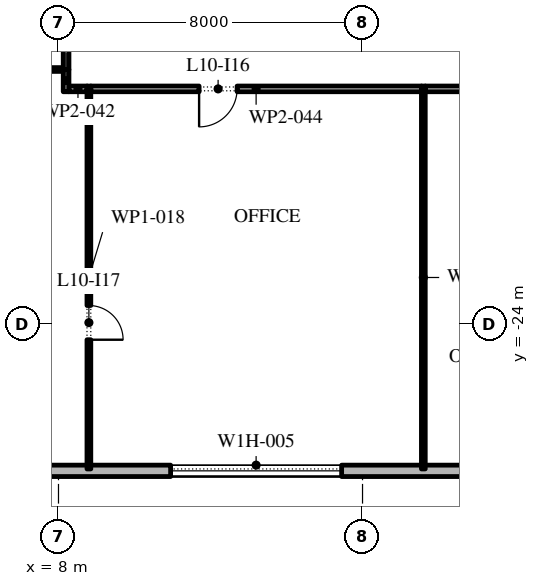
"""IFC4 building model, lengths in metres.
Left out: names, types, materials, properties, quantities, classifications, styles, units other than length and angle.
Written with IfcOpenShell. Run it as: python <this file> out.ifc"""

import sys

from ifc_helpers import new_model, si_unit, direction, frame, frame_2d, origin, place, context, subcontext, project, spatial, rectangle, extrude, element, fill, save


model = new_model("IFC4")
c1 = context("Model", 3, precision=1e-05, world=origin(), true_north=direction((0.0, 1.0)))
c2 = subcontext(c1, "Body", "Model", "MODEL_VIEW")
j1 = project(units=[si_unit("LENGTHUNIT", "METRE"), si_unit("PLANEANGLEUNIT", "RADIAN")], contexts=[c1])
p1 = place(None, origin())
s1 = spatial("IfcSite", under=j1, at=p1, CompositionType="ELEMENT")
p2 = place(p1, origin())
s2 = spatial("IfcBuilding", under=s1, at=p2, CompositionType="ELEMENT")
p3 = place(p2, frame((0.0, 0.0, 52.2)))
s3 = spatial("IfcBuildingStorey", under=s2, at=p3, CompositionType="ELEMENT", Elevation=52.2)
p4 = place(p3, frame((-26.1, -27.85, 0.0), z_axis=(0.0, 0.0, 1.0), x_axis=(1.0, 0.0, 0.0)))
e1 = element("IfcWall", 1, at=p4, inside=s3, PredefinedType="STANDARD", context=c2, shape_type="SweptSolid", body=[
    extrude(rectangle(XDim=52.5, YDim=0.3, at=frame_2d((26.25, 0.0))), origin(), (0.0, 0.0, 1.0), 4.0),
])
p5 = place(p4, frame((2.0, 0.0, 0.45)))
e2 = element("IfcOpeningElement", 2, at=p5, cuts=e1, PredefinedType="OPENING", context=c2, shape_type="SweptSolid", body=[
    extrude(rectangle(XDim=4.5, YDim=2.75, at=frame_2d((2.25, 1.375))), frame((0.0, 0.16, 0.0), z_axis=(0.0, -1.0, 0.0), x_axis=(1.0, 0.0, 0.0)), (0.0, 0.0, 1.0), 0.32),
])
p6 = place(p4, frame((10.65, 0.0, 0.45)))
e3 = element("IfcOpeningElement", 3, at=p6, cuts=e1, PredefinedType="OPENING", context=c2, shape_type="SweptSolid", body=[
    extrude(rectangle(XDim=4.5, YDim=2.75, at=frame_2d((2.25, 1.375))), frame((0.0, 0.16, 0.0), z_axis=(0.0, -1.0, 0.0), x_axis=(1.0, 0.0, 0.0)), (0.0, 0.0, 1.0), 0.32),
])
p7 = place(p4, frame((20.5, 0.0, 0.0)))
e4 = element("IfcOpeningElement", 4, at=p7, cuts=e1, PredefinedType="OPENING", context=c2, shape_type="SweptSolid", body=[
    extrude(rectangle(XDim=2.4, YDim=3.5, at=frame_2d((1.2, 1.75))), frame((0.0, 0.16, 0.0), z_axis=(0.0, -1.0, 0.0), x_axis=(1.0, 0.0, 0.0)), (0.0, 0.0, 1.0), 0.32),
])
p8 = place(p4, frame((28.25, 0.0, 0.45)))
e5 = element("IfcOpeningElement", 5, at=p8, cuts=e1, PredefinedType="OPENING", context=c2, shape_type="SweptSolid", body=[
    extrude(rectangle(XDim=4.5, YDim=2.75, at=frame_2d((2.25, 1.375))), frame((0.0, 0.16, 0.0), z_axis=(0.0, -1.0, 0.0), x_axis=(1.0, 0.0, 0.0)), (0.0, 0.0, 1.0), 0.32),
])
p9 = place(p4, frame((37.05, 0.0, 0.45)))
e6 = element("IfcOpeningElement", 6, at=p9, cuts=e1, PredefinedType="OPENING", context=c2, shape_type="SweptSolid", body=[
    extrude(rectangle(XDim=4.5, YDim=2.75, at=frame_2d((2.25, 1.375))), frame((0.0, 0.16, 0.0), z_axis=(0.0, -1.0, 0.0), x_axis=(1.0, 0.0, 0.0)), (0.0, 0.0, 1.0), 0.32),
])
p10 = place(p4, frame((45.85, 0.0, 0.45)))
e7 = element("IfcOpeningElement", 7, at=p10, cuts=e1, PredefinedType="OPENING", context=c2, shape_type="SweptSolid", body=[
    extrude(rectangle(XDim=4.5, YDim=2.75, at=frame_2d((2.25, 1.375))), frame((0.0, 0.16, 0.0), z_axis=(0.0, -1.0, 0.0), x_axis=(1.0, 0.0, 0.0)), (0.0, 0.0, 1.0), 0.32),
])
p11 = place(p3, frame((8.2, -17.875, 0.0), z_axis=(0.0, 0.0, 1.0), x_axis=(0.0, 1.0, 0.0)))
e8 = element("IfcWall", 8, at=p11, inside=s3, PredefinedType="PARTITIONING", context=c2, shape_type="SweptSolid", body=[
    extrude(rectangle(XDim=0.585, YDim=0.15, at=frame_2d((0.292, 0.0))), origin(), (0.0, 0.0, 1.0), 4.0),
])
p12 = place(p3, frame((8.125, -17.29, 0.0), z_axis=(0.0, 0.0, 1.0), x_axis=(-1.0, 0.0, 0.0)))
e9 = element("IfcWall", 9, at=p12, inside=s3, PredefinedType="PARTITIONING", context=c2, shape_type="SweptSolid", body=[
    extrude(rectangle(XDim=8.075, YDim=0.1, at=frame_2d((4.038, 0.0))), origin(), (0.0, 0.0, 1.0), 4.0),
])
p13 = place(p3, frame((8.2, -17.29, 0.0), z_axis=(0.0, 0.0, 1.0), x_axis=(0.0, 1.0, 0.0)))
e10 = element("IfcWall", 10, at=p13, inside=s3, PredefinedType="PARTITIONING", context=c2, shape_type="SweptSolid", body=[
    extrude(rectangle(XDim=8.74, YDim=0.15, at=frame_2d((4.37, 0.0))), origin(), (0.0, 0.0, 1.0), 4.0),
])
p14 = place(p13, frame((3.89, 0.0, 0.0)))
e11 = element("IfcOpeningElement", 11, at=p14, cuts=e10, PredefinedType="OPENING", context=c2, shape_type="SweptSolid", body=[
    extrude(rectangle(XDim=1.0, YDim=2.1, at=frame_2d((0.5, 1.05))), frame((0.0, 0.085, 0.0), z_axis=(0.0, -1.0, 0.0), x_axis=(1.0, 0.0, 0.0)), (0.0, 0.0, 1.0), 0.17),
])
p15 = place(p3, frame((8.8, -27.8, 0.0), z_axis=(0.0, 0.0, 1.0), x_axis=(0.0, 1.0, 0.0)))
e12 = element("IfcWall", 12, at=p15, inside=s3, PredefinedType="PARTITIONING", context=c2, shape_type="SweptSolid", body=[
    extrude(rectangle(XDim=10.075, YDim=0.1, at=frame_2d((5.038, 0.0))), origin(), (0.0, 0.0, 1.0), 4.0),
])
p16 = place(p15, frame((3.4, 0.0, 0.0)))
e13 = element("IfcOpeningElement", 13, at=p16, cuts=e12, PredefinedType="OPENING", context=c2, shape_type="SweptSolid", body=[
    extrude(rectangle(XDim=0.9, YDim=2.1, at=frame_2d((0.45, 1.05))), frame((0.0, 0.06, 0.0), z_axis=(0.0, -1.0, 0.0), x_axis=(1.0, 0.0, 0.0)), (0.0, 0.0, 1.0), 0.12),
])
p17 = place(p3, frame((8.75, -17.8, 0.0), z_axis=(0.0, 0.0, 1.0), x_axis=(-1.0, 0.0, 0.0)))
e14 = element("IfcWall", 14, at=p17, inside=s3, PredefinedType="PARTITIONING", context=c2, shape_type="SweptSolid", body=[
    extrude(rectangle(XDim=0.475, YDim=0.15, at=frame_2d((0.238, 0.0))), origin(), (0.0, 0.0, 1.0), 4.0),
])
p18 = place(p3, frame((17.6, -27.8, 0.0), z_axis=(0.0, 0.0, 1.0), x_axis=(0.0, 1.0, 0.0)))
e15 = element("IfcWall", 15, at=p18, inside=s3, PredefinedType="PARTITIONING", context=c2, shape_type="SweptSolid", body=[
    extrude(rectangle(XDim=10.075, YDim=0.1, at=frame_2d((5.038, 0.0))), origin(), (0.0, 0.0, 1.0), 4.0),
])
p19 = place(p3, frame((17.55, -17.8, 0.0), z_axis=(0.0, 0.0, 1.0), x_axis=(-1.0, 0.0, 0.0)))
e16 = element("IfcWall", 16, at=p19, inside=s3, PredefinedType="PARTITIONING", context=c2, shape_type="SweptSolid", body=[
    extrude(rectangle(XDim=8.7, YDim=0.15, at=frame_2d((4.35, 0.0))), origin(), (0.0, 0.0, 1.0), 4.0),
])
p20 = place(p19, frame((4.85, 0.0, 0.0)))
e17 = element("IfcOpeningElement", 17, at=p20, cuts=e16, PredefinedType="OPENING", context=c2, shape_type="SweptSolid", body=[
    extrude(rectangle(XDim=1.0, YDim=2.1, at=frame_2d((0.5, 1.05))), frame((0.0, 0.085, 0.0), z_axis=(0.0, -1.0, 0.0), x_axis=(1.0, 0.0, 0.0)), (0.0, 0.0, 1.0), 0.17),
])
p21 = place(p3, frame((23.875, -17.8, 0.0), z_axis=(0.0, 0.0, 1.0), x_axis=(-1.0, 0.0, 0.0)))
e18 = element("IfcWall", 18, at=p21, inside=s3, PredefinedType="PARTITIONING", context=c2, shape_type="SweptSolid", body=[
    extrude(rectangle(XDim=6.225, YDim=0.15, at=frame_2d((3.113, 0.0))), origin(), (0.0, 0.0, 1.0), 4.0),
])
p22 = place(p21, frame((2.125, 0.0, 0.0)))
e19 = element("IfcOpeningElement", 19, at=p22, cuts=e18, PredefinedType="OPENING", context=c2, shape_type="SweptSolid", body=[
    extrude(rectangle(XDim=1.0, YDim=2.1, at=frame_2d((0.5, 1.05))), frame((0.0, 0.085, 0.0), z_axis=(0.0, -1.0, 0.0), x_axis=(1.0, 0.0, 0.0)), (0.0, 0.0, 1.0), 0.17),
])
p23 = place(p9, origin())
e20 = element("IfcWindow", 20, at=p23, inside=s3, PartitioningType="DOUBLE_PANEL_VERTICAL", PredefinedType="WINDOW", context=c2, shape_type="SweptSolid", body=[
    extrude(rectangle(XDim=4.5, YDim=2.75, at=frame_2d((2.25, 1.375))), frame((0.0, 0.03, 0.0), z_axis=(0.0, -1.0, 0.0), x_axis=(1.0, 0.0, 0.0)), (0.0, 0.0, 1.0), 0.06),
])
fill(e6, e20)
p24 = place(p20, origin())
e21 = element("IfcDoor", 21, at=p24, inside=s3, OperationType="SINGLE_SWING_LEFT", PredefinedType="DOOR", context=c2, shape_type="SweptSolid", body=[
    extrude(rectangle(XDim=1.0, YDim=2.1, at=frame_2d((0.5, 1.05))), frame((0.0, 0.025, 0.0), z_axis=(0.0, -1.0, 0.0), x_axis=(1.0, 0.0, 0.0)), (0.0, 0.0, 1.0), 0.05),
])
fill(e17, e21)
p25 = place(p16, frame((0.9, 0.0, 0.0), z_axis=(0.0, 0.0, 1.0), x_axis=(-1.0, 0.0, 0.0)))
e22 = element("IfcDoor", 22, at=p25, inside=s3, OperationType="SINGLE_SWING_LEFT", PredefinedType="DOOR", context=c2, shape_type="SweptSolid", body=[
    extrude(rectangle(XDim=0.9, YDim=2.1, at=frame_2d((0.45, 1.05))), frame((0.0, 0.025, 0.0), z_axis=(0.0, -1.0, 0.0), x_axis=(1.0, 0.0, 0.0)), (0.0, 0.0, 1.0), 0.05),
])
fill(e13, e22)
save(model, sys.argv[1])
